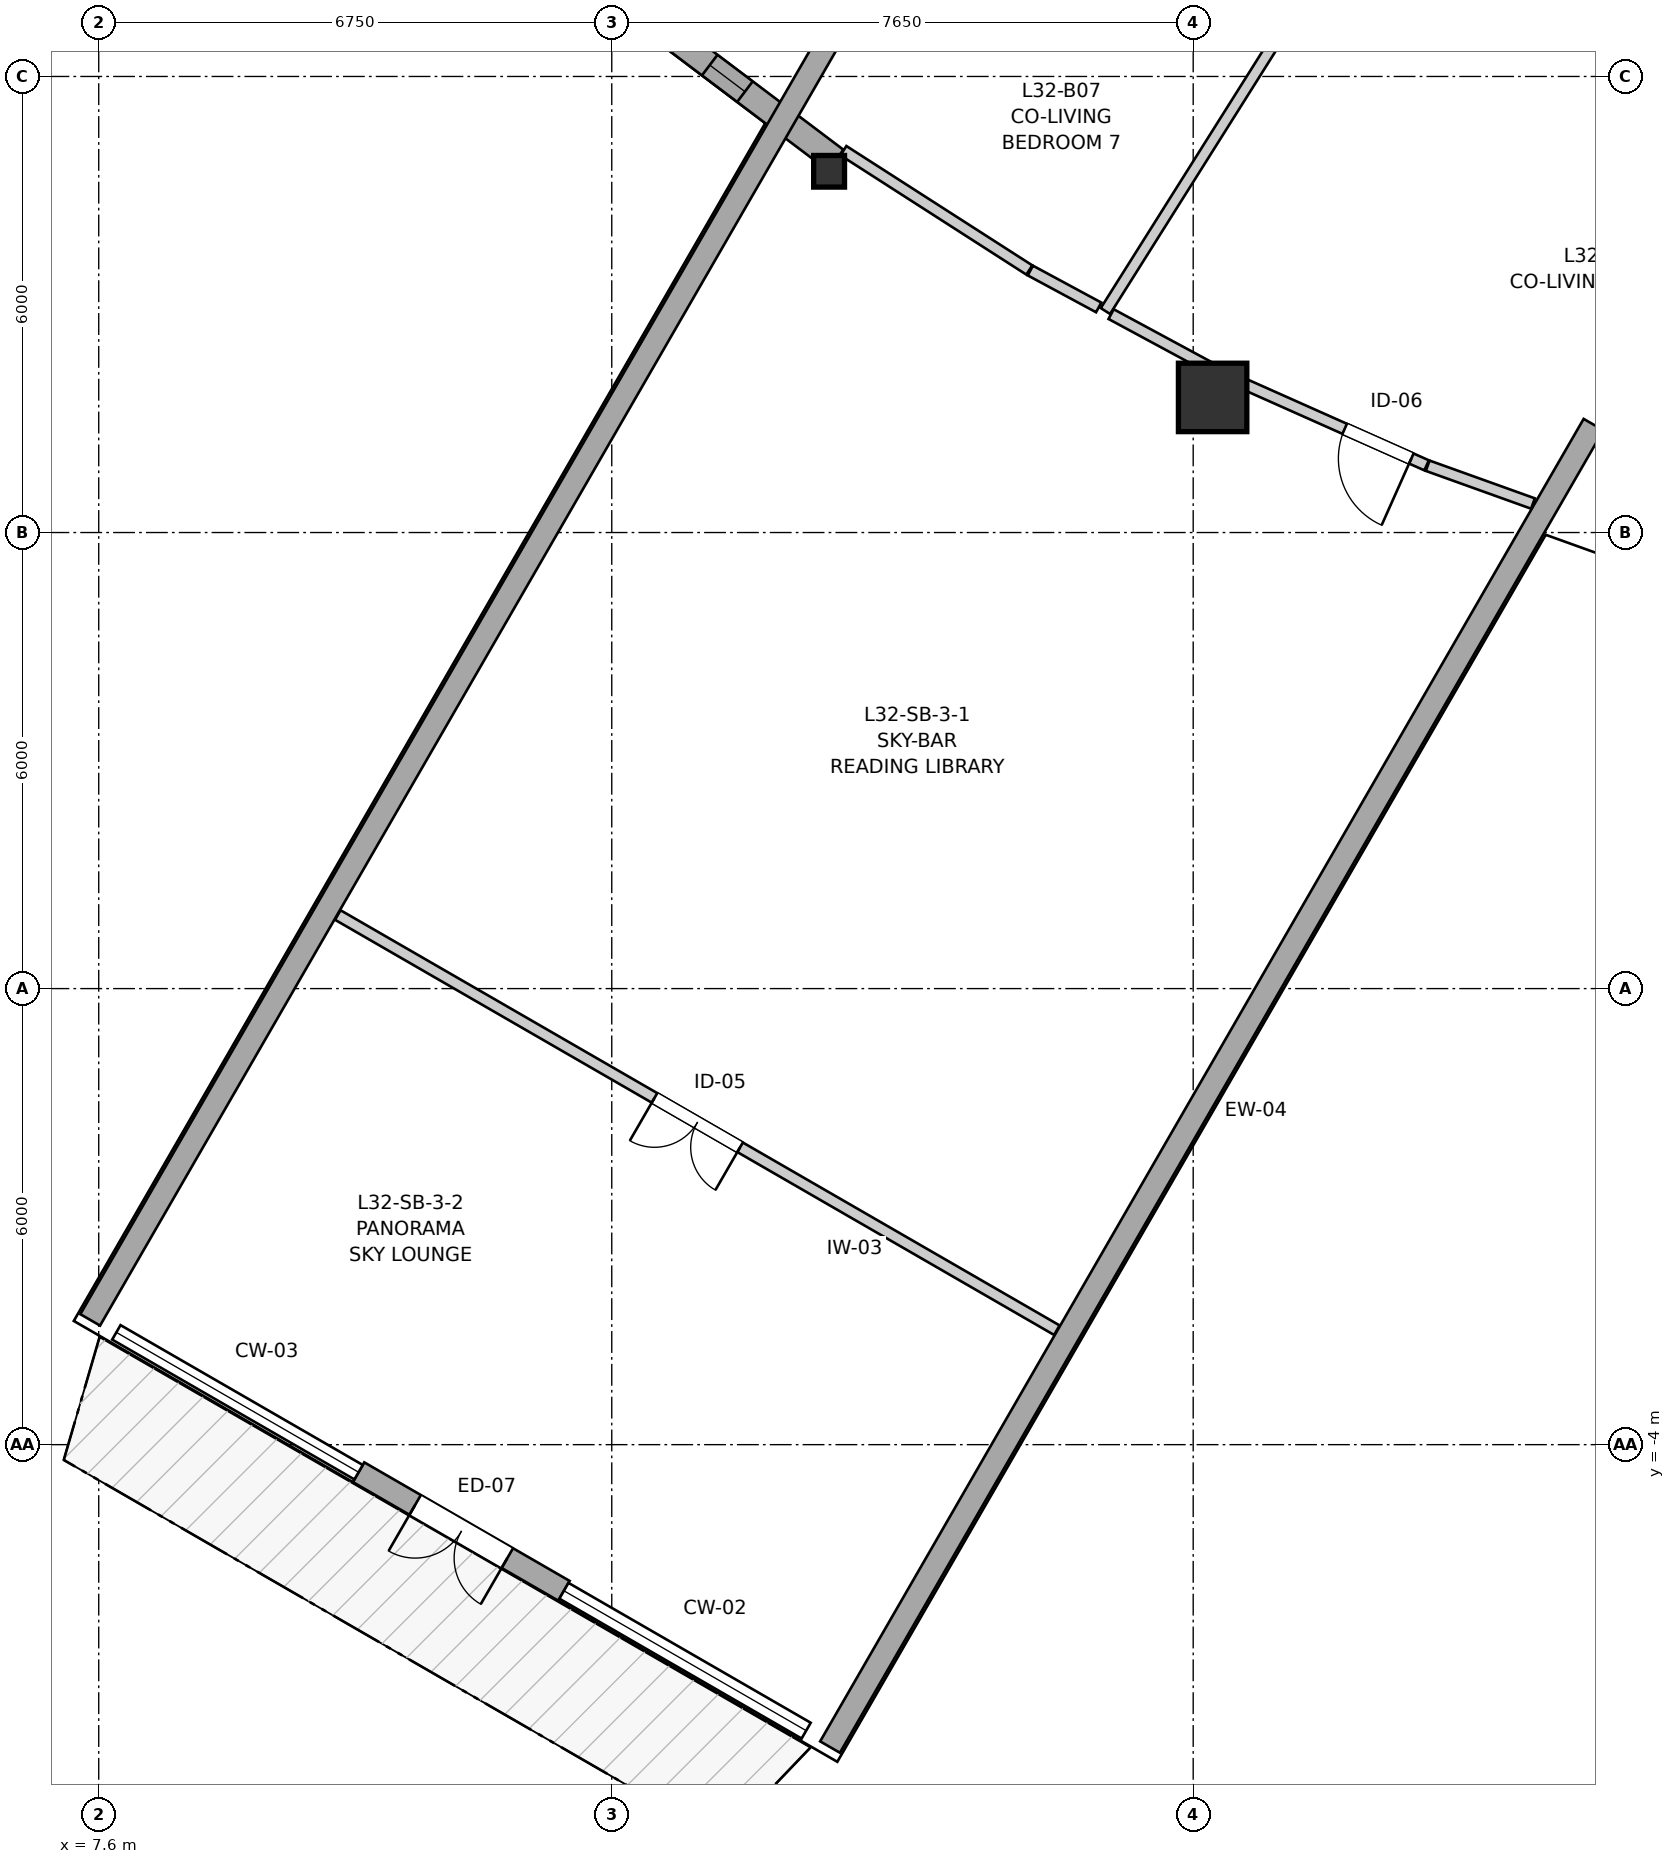
"""IFC4 building model, lengths in metres.
Left out: names, types, materials, properties, quantities, classifications, styles, units other than length and angle.
Written with IfcOpenShell. Run it as: python <this file> out.ifc"""

import sys

from ifc_helpers import new_model, si_unit, direction, frame, frame_2d, origin, origin_2d, place, context, subcontext, project, spatial, rectangle, i_section, extrude, source, transform, mapped, element, fill, save


model = new_model("IFC4")
c1 = context("Model", 3, precision=1e-05, world=origin(), true_north=direction((0.0, 1.0)))
c2 = subcontext(c1, "Body", "Model", "MODEL_VIEW")
j1 = project(units=[si_unit("LENGTHUNIT", "METRE"), si_unit("PLANEANGLEUNIT", "RADIAN")], contexts=[c1])
p1 = place(None, origin())
s1 = spatial("IfcSite", under=j1, at=p1, CompositionType="ELEMENT")
p2 = place(p1, origin())
s2 = spatial("IfcBuilding", under=s1, at=p2, CompositionType="ELEMENT")
p3 = place(p2, frame((0.0, 0.0, 108.8)))
s3 = spatial("IfcBuildingStorey", under=s2, at=p3, CompositionType="ELEMENT", Elevation=108.8)
m1 = source(origin(), c2, "Body", "SweptSolid", [
    extrude(i_section(OverallWidth=0.406, OverallDepth=0.416, WebThickness=0.027, FlangeThickness=0.044, FilletRadius=0.015, at=origin_2d()), origin(), (0.0, 0.0, 1.0), 2.935),
])
p4 = place(p3, frame((17.209, 12.753, 0.0), z_axis=(0.0, 0.0, 1.0), x_axis=(1.0, 0.0, 0.0)))
e1 = element("IfcColumn", 1, at=p4, inside=s3, PredefinedType="PILASTER", context=c2, shape_type="MappedRepresentation", body=[
    mapped(m1, transform((0.0, 0.0, 0.0), x_axis=(1.0, 0.0, 0.0), y_axis=(0.0, 1.0, 0.0), z_axis=(0.0, 0.0, 1.0), scale=1.0)),
])
m2 = source(origin(), c2, "Body", "SweptSolid", [
    extrude(rectangle(XDim=0.9, YDim=0.9, at=origin_2d()), origin(), (0.0, 0.0, 1.0), 2.935),
])
p5 = place(p3, frame((22.256, 9.778, 0.0), z_axis=(0.0, 0.0, 1.0), x_axis=(1.0, 0.0, 0.0)))
e2 = element("IfcColumn", 2, at=p5, inside=s3, PredefinedType="COLUMN", context=c2, shape_type="MappedRepresentation", body=[
    mapped(m2, transform((0.0, 0.0, 0.0), x_axis=(1.0, 0.0, 0.0), y_axis=(0.0, 1.0, 0.0), z_axis=(0.0, 0.0, 1.0), scale=1.0)),
])
p6 = place(p3, frame((14.928, 14.686, 0.0), z_axis=(0.0, 0.0, 1.0), x_axis=(0.798387010211, -0.602144651995, 0.0)))
e3 = element("IfcWall", 3, at=p6, inside=s3, PredefinedType="SOLIDWALL", context=c2, shape_type="SweptSolid", body=[
    extrude(rectangle(XDim=2.966, YDim=0.34, at=frame_2d((1.483, 0.0))), origin(), (0.0, 0.0, 1.0), 2.465),
])
p7 = place(p6, frame((0.891, 0.0, 0.82)))
e4 = element("IfcOpeningElement", 4, at=p7, cuts=e3, PredefinedType="OPENING", context=c2, shape_type="SweptSolid", body=[
    extrude(rectangle(XDim=0.58, YDim=1.35, at=frame_2d((0.29, 0.675))), frame((0.0, 0.18, 0.0), z_axis=(0.0, -1.0, 0.0), x_axis=(1.0, 0.0, 0.0)), (0.0, 0.0, 1.0), 0.36),
])
p8 = place(p3, frame((27.267, 9.42, 0.0), z_axis=(0.0, 0.0, 1.0), x_axis=(-0.500001212782, -0.866024703583, 0.0)))
e5 = element("IfcWall", 5, at=p8, inside=s3, PredefinedType="SOLIDWALL", context=c2, shape_type="SweptSolid", body=[
    extrude(rectangle(XDim=20.09, YDim=0.3, at=frame_2d((10.045, 0.0))), origin(), (0.0, 0.0, 1.0), 2.115),
])
p9 = place(p3, frame((17.533, 15.04, 0.0), z_axis=(0.0, 0.0, 1.0), x_axis=(-0.499995950774, -0.866027741594, 0.0)))
e6 = element("IfcWall", 6, at=p9, inside=s3, PredefinedType="SOLIDWALL", context=c2, shape_type="SweptSolid", body=[
    extrude(rectangle(XDim=20.091, YDim=0.3, at=frame_2d((10.045, 0.0))), origin(), (0.0, 0.0, 1.0), 2.115),
])
p10 = place(p3, frame((13.721, -5.923, 0.0), z_axis=(0.0, 0.0, 1.0), x_axis=(-0.866009661879, 0.500027264788, 0.0)))
e7 = element("IfcWall", 7, at=p10, inside=s3, PredefinedType="SOLIDWALL", context=c2, shape_type="SweptSolid", body=[
    extrude(rectangle(XDim=3.12, YDim=0.3, at=frame_2d((1.56, 0.0))), origin(), (0.0, 0.0, 1.0), 2.3),
])
p11 = place(p10, frame((0.86, 0.0, 0.0)))
e8 = element("IfcOpeningElement", 8, at=p11, cuts=e7, PredefinedType="OPENING", context=c2, shape_type="SweptSolid", body=[
    extrude(rectangle(XDim=1.4, YDim=2.15, at=frame_2d((0.7, 1.075))), frame((0.0, 0.16, 0.0), z_axis=(0.0, -1.0, 0.0), x_axis=(1.0, 0.0, 0.0)), (0.0, 0.0, 1.0), 0.32),
])
p12 = place(p3, frame((20.206, -2.494, 0.0), z_axis=(0.0, 0.0, 1.0), x_axis=(-0.866034115916, 0.499984909842, 0.0)))
e9 = element("IfcWall", 9, at=p12, inside=s3, PredefinedType="PARTITIONING", context=c2, shape_type="SweptSolid", body=[
    extrude(rectangle(XDim=10.924, YDim=0.145, at=frame_2d((5.462, 0.0))), origin(), (0.0, 0.0, 1.0), 2.353),
])
p13 = place(p12, frame((4.812, 0.0, 0.0)))
e10 = element("IfcOpeningElement", 10, at=p13, cuts=e9, PredefinedType="OPENING", context=c2, shape_type="SweptSolid", body=[
    extrude(rectangle(XDim=1.3, YDim=2.1, at=frame_2d((0.65, 1.05))), frame((0.0, 0.083, 0.0), z_axis=(0.0, -1.0, 0.0), x_axis=(1.0, 0.0, 0.0)), (0.0, 0.0, 1.0), 0.165),
])
p14 = place(p3, frame((25.071, 8.884, 0.0), z_axis=(0.0, 0.0, 1.0), x_axis=(-0.913404708383, 0.407052623997, 0.0)))
e11 = element("IfcWall", 11, at=p14, inside=s3, PredefinedType="PARTITIONING", context=c2, shape_type="SweptSolid", body=[
    extrude(rectangle(XDim=2.923, YDim=0.145, at=frame_2d((1.462, 0.0))), origin(), (0.0, 0.0, 1.0), 2.453),
])
p15 = place(p14, frame((0.22, 0.0, 0.0)))
e12 = element("IfcOpeningElement", 12, at=p15, cuts=e11, PredefinedType="OPENING", context=c2, shape_type="SweptSolid", body=[
    extrude(rectangle(XDim=0.96, YDim=2.1, at=frame_2d((0.48, 1.05))), frame((0.0, 0.083, 0.0), z_axis=(0.0, -1.0, 0.0), x_axis=(1.0, 0.0, 0.0)), (0.0, 0.0, 1.0), 0.165),
])
p16 = place(p3, frame((20.845, 10.914, 0.0), z_axis=(0.0, 0.0, 1.0), x_axis=(0.533007953382, 0.846110230189, 0.0)))
e13 = element("IfcWall", 13, at=p16, inside=s3, PredefinedType="PARTITIONING", context=c2, shape_type="SweptSolid", body=[
    extrude(rectangle(XDim=5.354, YDim=0.145, at=frame_2d((2.677, 0.0))), origin(), (0.0, 0.0, 1.0), 2.935),
])
p17 = place(p3, frame((17.398, 13.024, 0.0), z_axis=(0.0, 0.0, 1.0), x_axis=(0.841590343852, -0.540116369994, 0.0)))
e14 = element("IfcWall", 14, at=p17, inside=s3, PredefinedType="PARTITIONING", context=c2, shape_type="SweptSolid", body=[
    extrude(rectangle(XDim=2.906, YDim=0.145, at=frame_2d((1.453, 0.0))), origin(), (0.0, 0.0, 1.0), 2.453),
])
p18 = place(p3, frame((20.92, 10.873, 0.0), z_axis=(0.0, 0.0, 1.0), x_axis=(0.879929881444, -0.475103571595, 0.0)))
e15 = element("IfcWall", 15, at=p18, inside=s3, PredefinedType="PARTITIONING", context=c2, shape_type="SweptSolid", body=[
    extrude(rectangle(XDim=1.667, YDim=0.145, at=frame_2d((0.834, 0.0))), origin(), (0.0, 0.0, 1.0), 2.453),
])
p19 = place(p3, frame((25.085, 8.879, 0.0), z_axis=(0.0, 0.0, 1.0), x_axis=(0.941166260093, -0.337943887151, 0.0)))
e16 = element("IfcWall", 16, at=p19, inside=s3, PredefinedType="PARTITIONING", context=c2, shape_type="SweptSolid", body=[
    extrude(rectangle(XDim=1.472, YDim=0.145, at=frame_2d((0.736, 0.0))), origin(), (0.0, 0.0, 1.0), 2.453),
])
p20 = place(p3, frame((19.857, 11.447, 0.0), z_axis=(0.0, 0.0, 1.0), x_axis=(0.8800411893, -0.474897362738, 0.0)))
e17 = element("IfcWall", 17, at=p20, inside=s3, PredefinedType="PARTITIONING", context=c2, shape_type="SweptSolid", body=[
    extrude(rectangle(XDim=1.022, YDim=0.145, at=frame_2d((0.511, 0.0))), origin(), (0.0, 0.0, 1.0), 2.453),
])
m3 = source(origin(), c2, "Body", "SweptSolid", [
    extrude(rectangle(XDim=0.58, YDim=1.35, at=frame_2d((0.29, 0.675))), frame((0.0, 0.03, 0.0), z_axis=(0.0, -1.0, 0.0), x_axis=(1.0, 0.0, 0.0)), (0.0, 0.0, 1.0), 0.06),
])
p21 = place(p7, origin())
e18 = element("IfcWindow", 18, at=p21, inside=s3, PartitioningType="SINGLE_PANEL", PredefinedType="WINDOW", context=c2, shape_type="MappedRepresentation", body=[
    mapped(m3, transform((0.0, 0.0, 0.0), x_axis=(1.0, 0.0, 0.0), y_axis=(0.0, 1.0, 0.0), z_axis=(0.0, 0.0, 1.0), scale=1.0)),
])
fill(e4, e18)
m4 = source(origin(), c2, "Body", "SweptSolid", [
    extrude(rectangle(XDim=1.4, YDim=2.15, at=frame_2d((0.7, 1.075))), frame((0.0, 0.025, 0.0), z_axis=(0.0, -1.0, 0.0), x_axis=(1.0, 0.0, 0.0)), (0.0, 0.0, 1.0), 0.05),
])
p22 = place(p11, origin())
e19 = element("IfcDoor", 19, at=p22, inside=s3, OperationType="DOUBLE_DOOR_SINGLE_SWING", PredefinedType="DOOR", context=c2, shape_type="MappedRepresentation", body=[
    mapped(m4, transform((0.0, 0.0, 0.0), x_axis=(1.0, 0.0, 0.0), y_axis=(0.0, 1.0, 0.0), z_axis=(0.0, 0.0, 1.0), scale=1.0)),
])
fill(e8, e19)
m5 = source(origin(), c2, "Body", "SweptSolid", [
    extrude(rectangle(XDim=1.3, YDim=2.1, at=frame_2d((0.65, 1.05))), frame((0.0, 0.025, 0.0), z_axis=(0.0, -1.0, 0.0), x_axis=(1.0, 0.0, 0.0)), (0.0, 0.0, 1.0), 0.05),
])
p23 = place(p13, origin())
e20 = element("IfcDoor", 20, at=p23, inside=s3, OperationType="DOUBLE_DOOR_SINGLE_SWING", PredefinedType="DOOR", context=c2, shape_type="MappedRepresentation", body=[
    mapped(m5, transform((0.0, 0.0, 0.0), x_axis=(1.0, 0.0, 0.0), y_axis=(0.0, 1.0, 0.0), z_axis=(0.0, 0.0, 1.0), scale=1.0)),
])
fill(e10, e20)
m6 = source(origin(), c2, "Body", "SweptSolid", [
    extrude(rectangle(XDim=0.96, YDim=2.1, at=frame_2d((0.48, 1.05))), frame((0.0, 0.025, 0.0), z_axis=(0.0, -1.0, 0.0), x_axis=(1.0, 0.0, 0.0)), (0.0, 0.0, 1.0), 0.05),
])
p24 = place(p15, origin())
e21 = element("IfcDoor", 21, at=p24, inside=s3, OperationType="SINGLE_SWING_LEFT", PredefinedType="DOOR", context=c2, shape_type="MappedRepresentation", body=[
    mapped(m6, transform((0.0, 0.0, 0.0), x_axis=(1.0, 0.0, 0.0), y_axis=(0.0, 1.0, 0.0), z_axis=(0.0, 0.0, 1.0), scale=1.0)),
])
fill(e12, e21)
save(model, sys.argv[1])
